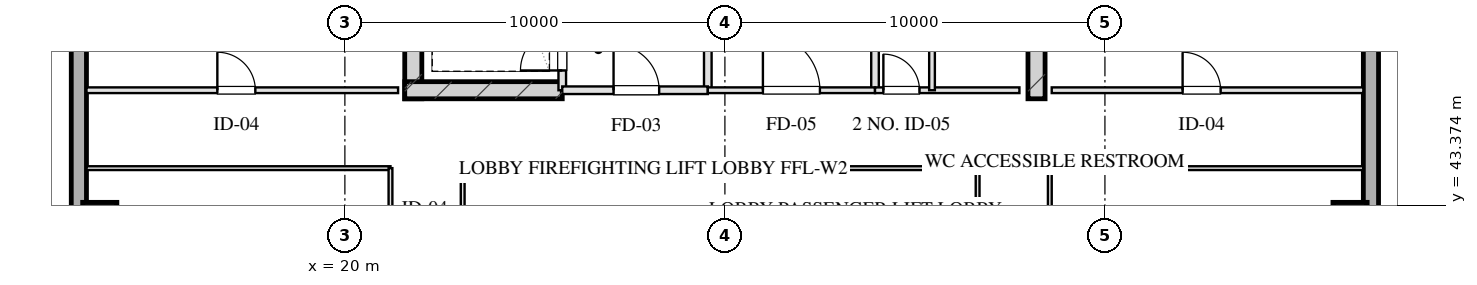
"""IFC4 building model, lengths in metres.
Left out: names, types, materials, properties, quantities, classifications, styles, units other than length and angle.
Written with IfcOpenShell. Run it as: python <this file> out.ifc"""

import sys

from ifc_helpers import new_model, si_unit, direction, frame, frame_2d, origin, origin_2d, place, context, subcontext, project, spatial, rectangle, hollow_rectangle, extrude, element, fill, save


model = new_model("IFC4")
c1 = context("Model", 3, precision=1e-05, world=origin(), true_north=direction((0.0, 1.0)))
c2 = subcontext(c1, "Body", "Model", "MODEL_VIEW")
j1 = project(units=[si_unit("LENGTHUNIT", "METRE"), si_unit("PLANEANGLEUNIT", "RADIAN")], contexts=[c1])
p1 = place(None, origin())
s1 = spatial("IfcSite", under=j1, at=p1, CompositionType="ELEMENT")
p2 = place(p1, origin())
s2 = spatial("IfcBuilding", under=s1, at=p2, CompositionType="ELEMENT")
p3 = place(p2, frame((0.0, 0.0, 212.75)))
s3 = spatial("IfcBuildingStorey", under=s2, at=p3, CompositionType="ELEMENT", Elevation=212.75)
for number, where, z_axis, x_axis in (
    (1, (21.8, 46.175, 0.0), (0.0, 0.0, 1.0), (0.0, 1.0, 0.0)),
    (2, (38.2, 46.175, 0.0), (0.0, 0.0, 1.0), (0.0, 1.0, 0.0)),
):
    element("IfcWall", number, at=place(p3, frame(where, z_axis=z_axis, x_axis=x_axis)), inside=s3, PredefinedType="SHEAR", context=c2, shape_type="SweptSolid", body=[
        extrude(rectangle(XDim=9.33, YDim=0.45, at=frame_2d((4.665, 0.0))), origin(), (0.0, 0.0, 1.0), 3.45),
    ])
p4 = place(p3, frame((21.575, 46.4, 0.0), z_axis=(0.0, 0.0, 1.0), x_axis=(1.0, 0.0, 0.0)))
e3 = element("IfcWall", 3, at=p4, inside=s3, PredefinedType="SHEAR", context=c2, shape_type="SweptSolid", body=[
    extrude(rectangle(XDim=4.145, YDim=0.45, at=frame_2d((2.073, 0.0))), origin(), (0.0, 0.0, 1.0), 3.45),
])
for number, where, z_axis, x_axis in (
    (4, (13.55, 43.0, 0.0), (0.0, 0.0, 1.0), (1.0, 0.0, 0.0)),
    (5, (46.45, 43.0, 0.0), (0.0, 0.0, 1.0), (1.0, 0.0, 0.0)),
):
    element("IfcColumn", number, at=place(p3, frame(where, z_axis=z_axis, x_axis=x_axis)), inside=s3, PredefinedType="COLUMN", context=c2, shape_type="SweptSolid", body=[
        extrude(hollow_rectangle(XDim=0.9, YDim=0.9, WallThickness=0.032, at=origin_2d()), origin(), (0.0, 0.0, 1.0), 3.451),
    ])
p5 = place(p3, frame((13.0, 10.8, 0.0), z_axis=(0.0, 0.0, 1.0), x_axis=(0.0, 1.0, 0.0)))
e6 = element("IfcWall", 6, at=p5, inside=s3, PredefinedType="SOLIDWALL", context=c2, shape_type="SweptSolid", body=[
    extrude(rectangle(XDim=46.4, YDim=0.4, at=frame_2d((23.2, 0.0))), origin(), (0.0, 0.0, 1.0), 2.55),
])
p6 = place(p5, frame((15.75, 0.0, 0.75)))
e7 = element("IfcOpeningElement", 7, at=p6, cuts=e6, PredefinedType="OPENING", context=c2, shape_type="SweptSolid", body=[
    extrude(rectangle(XDim=2.1, YDim=1.4, at=frame_2d((1.05, 0.7))), frame((0.0, 0.21, 0.0), z_axis=(0.0, -1.0, 0.0), x_axis=(1.0, 0.0, 0.0)), (0.0, 0.0, 1.0), 0.42),
])
p7 = place(p5, frame((19.55, 0.0, 0.75)))
e8 = element("IfcOpeningElement", 8, at=p7, cuts=e6, PredefinedType="OPENING", context=c2, shape_type="SweptSolid", body=[
    extrude(rectangle(XDim=2.1, YDim=1.4, at=frame_2d((1.05, 0.7))), frame((0.0, 0.21, 0.0), z_axis=(0.0, -1.0, 0.0), x_axis=(1.0, 0.0, 0.0)), (0.0, 0.0, 1.0), 0.42),
])
p8 = place(p5, frame((24.75, 0.0, 0.75)))
e9 = element("IfcOpeningElement", 9, at=p8, cuts=e6, PredefinedType="OPENING", context=c2, shape_type="SweptSolid", body=[
    extrude(rectangle(XDim=2.1, YDim=1.4, at=frame_2d((1.05, 0.7))), frame((0.0, 0.21, 0.0), z_axis=(0.0, -1.0, 0.0), x_axis=(1.0, 0.0, 0.0)), (0.0, 0.0, 1.0), 0.42),
])
p9 = place(p5, frame((28.55, 0.0, 0.75)))
e10 = element("IfcOpeningElement", 10, at=p9, cuts=e6, PredefinedType="OPENING", context=c2, shape_type="SweptSolid", body=[
    extrude(rectangle(XDim=2.1, YDim=1.4, at=frame_2d((1.05, 0.7))), frame((0.0, 0.21, 0.0), z_axis=(0.0, -1.0, 0.0), x_axis=(1.0, 0.0, 0.0)), (0.0, 0.0, 1.0), 0.42),
])
p10 = place(p3, frame((47.0, 57.2, 0.0), z_axis=(0.0, 0.0, 1.0), x_axis=(0.0, -1.0, 0.0)))
e11 = element("IfcWall", 11, at=p10, inside=s3, PredefinedType="SOLIDWALL", context=c2, shape_type="SweptSolid", body=[
    extrude(rectangle(XDim=46.4, YDim=0.4, at=frame_2d((23.2, 0.0))), origin(), (0.0, 0.0, 1.0), 2.55),
])
p11 = place(p10, frame((28.55, 0.0, 0.75)))
e12 = element("IfcOpeningElement", 12, at=p11, cuts=e11, PredefinedType="OPENING", context=c2, shape_type="SweptSolid", body=[
    extrude(rectangle(XDim=2.1, YDim=1.4, at=frame_2d((1.05, 0.7))), frame((0.0, 0.21, 0.0), z_axis=(0.0, -1.0, 0.0), x_axis=(1.0, 0.0, 0.0)), (0.0, 0.0, 1.0), 0.42),
])
p12 = place(p10, frame((24.75, 0.0, 0.75)))
e13 = element("IfcOpeningElement", 13, at=p12, cuts=e11, PredefinedType="OPENING", context=c2, shape_type="SweptSolid", body=[
    extrude(rectangle(XDim=2.1, YDim=1.4, at=frame_2d((1.05, 0.7))), frame((0.0, 0.21, 0.0), z_axis=(0.0, -1.0, 0.0), x_axis=(1.0, 0.0, 0.0)), (0.0, 0.0, 1.0), 0.42),
])
p13 = place(p10, frame((19.55, 0.0, 0.75)))
e14 = element("IfcOpeningElement", 14, at=p13, cuts=e11, PredefinedType="OPENING", context=c2, shape_type="SweptSolid", body=[
    extrude(rectangle(XDim=2.1, YDim=1.4, at=frame_2d((1.05, 0.7))), frame((0.0, 0.21, 0.0), z_axis=(0.0, -1.0, 0.0), x_axis=(1.0, 0.0, 0.0)), (0.0, 0.0, 1.0), 0.42),
])
p14 = place(p10, frame((15.75, 0.0, 0.75)))
e15 = element("IfcOpeningElement", 15, at=p14, cuts=e11, PredefinedType="OPENING", context=c2, shape_type="SweptSolid", body=[
    extrude(rectangle(XDim=2.1, YDim=1.4, at=frame_2d((1.05, 0.7))), frame((0.0, 0.21, 0.0), z_axis=(0.0, -1.0, 0.0), x_axis=(1.0, 0.0, 0.0)), (0.0, 0.0, 1.0), 0.42),
])
p15 = place(p3, frame((25.72, 46.4, 0.0), z_axis=(0.0, 0.0, 1.0), x_axis=(0.0, 1.0, 0.0)))
e16 = element("IfcWall", 16, at=p15, inside=s3, PredefinedType="PARTITIONING", context=c2, shape_type="SweptSolid", body=[
    extrude(rectangle(XDim=1.9, YDim=0.2, at=frame_2d((0.95, 0.0))), origin(), (0.0, 0.0, 1.0), 3.155),
])
p16 = place(p15, frame((0.52, 0.0, 0.0)))
e17 = element("IfcOpeningElement", 17, at=p16, cuts=e16, PredefinedType="OPENING", context=c2, shape_type="SweptSolid", body=[
    extrude(rectangle(XDim=1.1, YDim=2.05, at=frame_2d((0.55, 1.025))), frame((0.0, 0.11, 0.0), z_axis=(0.0, -1.0, 0.0), x_axis=(1.0, 0.0, 0.0)), (0.0, 0.0, 1.0), 0.22),
])
p17 = place(p3, frame((29.55, 46.4, 0.0), z_axis=(0.0, 0.0, 1.0), x_axis=(0.0, 1.0, 0.0)))
e18 = element("IfcWall", 18, at=p17, inside=s3, PredefinedType="PARTITIONING", context=c2, shape_type="SweptSolid", body=[
    extrude(rectangle(XDim=8.43, YDim=0.2, at=frame_2d((4.215, 0.0))), origin(), (0.0, 0.0, 1.0), 3.155),
])
p18 = place(p17, frame((5.95, 0.0, 0.0)))
e19 = element("IfcOpeningElement", 19, at=p18, cuts=e18, PredefinedType="OPENING", context=c2, shape_type="SweptSolid", body=[
    extrude(rectangle(XDim=0.9, YDim=2.05, at=frame_2d((0.45, 1.025))), frame((0.0, 0.11, 0.0), z_axis=(0.0, -1.0, 0.0), x_axis=(1.0, 0.0, 0.0)), (0.0, 0.0, 1.0), 0.22),
])
p19 = place(p3, frame((25.72, 46.4, 0.0), z_axis=(0.0, 0.0, 1.0), x_axis=(1.0, 0.0, 0.0)))
e20 = element("IfcWall", 20, at=p19, inside=s3, PredefinedType="PARTITIONING", context=c2, shape_type="SweptSolid", body=[
    extrude(rectangle(XDim=3.83, YDim=0.2, at=frame_2d((1.915, 0.0))), origin(), (0.0, 0.0, 1.0), 3.155),
])
p20 = place(p19, frame((1.35, 0.0, 0.0)))
e21 = element("IfcOpeningElement", 21, at=p20, cuts=e20, PredefinedType="OPENING", context=c2, shape_type="SweptSolid", body=[
    extrude(rectangle(XDim=1.2, YDim=2.05, at=frame_2d((0.6, 1.025))), frame((0.0, 0.11, 0.0), z_axis=(0.0, -1.0, 0.0), x_axis=(1.0, 0.0, 0.0)), (0.0, 0.0, 1.0), 0.22),
])
p21 = place(p3, frame((33.95, 46.4, 0.0), z_axis=(0.0, 0.0, 1.0), x_axis=(0.0, 1.0, 0.0)))
e22 = element("IfcWall", 22, at=p21, inside=s3, PredefinedType="PARTITIONING", context=c2, shape_type="SweptSolid", body=[
    extrude(rectangle(XDim=8.43, YDim=0.2, at=frame_2d((4.215, 0.0))), origin(), (0.0, 0.0, 1.0), 3.155),
])
p22 = place(p3, frame((29.55, 46.4, 0.0), z_axis=(0.0, 0.0, 1.0), x_axis=(1.0, 0.0, 0.0)))
e23 = element("IfcWall", 23, at=p22, inside=s3, PredefinedType="PARTITIONING", context=c2, shape_type="SweptSolid", body=[
    extrude(rectangle(XDim=4.4, YDim=0.15, at=frame_2d((2.2, 0.0))), origin(), (0.0, 0.0, 1.0), 3.155),
])
p23 = place(p22, frame((1.45, 0.0, 0.0)))
e24 = element("IfcOpeningElement", 24, at=p23, cuts=e23, PredefinedType="OPENING", context=c2, shape_type="SweptSolid", body=[
    extrude(rectangle(XDim=1.5, YDim=2.05, at=frame_2d((0.75, 1.025))), frame((0.0, 0.085, 0.0), z_axis=(0.0, -1.0, 0.0), x_axis=(1.0, 0.0, 0.0)), (0.0, 0.0, 1.0), 0.17),
])
p24 = place(p3, frame((33.95, 46.4, 0.0), z_axis=(0.0, 0.0, 1.0), x_axis=(1.0, 0.0, 0.0)))
e25 = element("IfcWall", 25, at=p24, inside=s3, PredefinedType="PARTITIONING", context=c2, shape_type="SweptSolid", body=[
    extrude(rectangle(XDim=3.8, YDim=0.15, at=frame_2d((1.9, 0.0))), origin(), (0.0, 0.0, 1.0), 3.155),
])
p25 = place(p24, frame((0.22, 0.0, 0.0)))
e26 = element("IfcOpeningElement", 26, at=p25, cuts=e25, PredefinedType="OPENING", context=c2, shape_type="SweptSolid", body=[
    extrude(rectangle(XDim=0.95, YDim=2.05, at=frame_2d((0.475, 1.025))), frame((0.0, 0.085, 0.0), z_axis=(0.0, -1.0, 0.0), x_axis=(1.0, 0.0, 0.0)), (0.0, 0.0, 1.0), 0.17),
])
p26 = place(p3, frame((35.45, 46.4, 0.0), z_axis=(0.0, 0.0, 1.0), x_axis=(0.0, 1.0, 0.0)))
e27 = element("IfcWall", 27, at=p26, inside=s3, PredefinedType="PARTITIONING", context=c2, shape_type="SweptSolid", body=[
    extrude(rectangle(XDim=8.43, YDim=0.15, at=frame_2d((4.215, 0.0))), origin(), (0.0, 0.0, 1.0), 2.795),
])
p27 = place(p26, frame((2.55, 0.0, 0.0)))
e28 = element("IfcOpeningElement", 28, at=p27, cuts=e27, PredefinedType="OPENING", context=c2, shape_type="SweptSolid", body=[
    extrude(rectangle(XDim=0.95, YDim=2.05, at=frame_2d((0.475, 1.025))), frame((0.0, 0.085, 0.0), z_axis=(0.0, -1.0, 0.0), x_axis=(1.0, 0.0, 0.0)), (0.0, 0.0, 1.0), 0.17),
])
p28 = place(p26, frame((5.8, 0.0, 0.0)))
e29 = element("IfcOpeningElement", 29, at=p28, cuts=e27, PredefinedType="OPENING", context=c2, shape_type="SweptSolid", body=[
    extrude(rectangle(XDim=0.9, YDim=2.05, at=frame_2d((0.45, 1.025))), frame((0.0, 0.085, 0.0), z_axis=(0.0, -1.0, 0.0), x_axis=(1.0, 0.0, 0.0)), (0.0, 0.0, 1.0), 0.17),
])
p29 = place(p3, frame((13.2, 46.4, 0.0), z_axis=(0.0, 0.0, 1.0), x_axis=(1.0, 0.0, 0.0)))
e30 = element("IfcWall", 30, at=p29, inside=s3, PredefinedType="PARTITIONING", context=c2, shape_type="SweptSolid", body=[
    extrude(rectangle(XDim=8.2, YDim=0.15, at=frame_2d((4.1, 0.0))), origin(), (0.0, 0.0, 1.0), 3.155),
])
p30 = place(p29, frame((3.444, 0.0, 0.0)))
e31 = element("IfcOpeningElement", 31, at=p30, cuts=e30, PredefinedType="OPENING", context=c2, shape_type="SweptSolid", body=[
    extrude(rectangle(XDim=1.0, YDim=2.05, at=frame_2d((0.5, 1.025))), frame((0.0, 0.085, 0.0), z_axis=(0.0, -1.0, 0.0), x_axis=(1.0, 0.0, 0.0)), (0.0, 0.0, 1.0), 0.17),
])
p31 = place(p3, frame((38.6, 46.4, 0.0), z_axis=(0.0, 0.0, 1.0), x_axis=(1.0, 0.0, 0.0)))
e32 = element("IfcWall", 32, at=p31, inside=s3, PredefinedType="PARTITIONING", context=c2, shape_type="SweptSolid", body=[
    extrude(rectangle(XDim=8.2, YDim=0.15, at=frame_2d((4.1, 0.0))), origin(), (0.0, 0.0, 1.0), 3.155),
])
p32 = place(p31, frame((3.444, 0.0, 0.0)))
e33 = element("IfcOpeningElement", 33, at=p32, cuts=e32, PredefinedType="OPENING", context=c2, shape_type="SweptSolid", body=[
    extrude(rectangle(XDim=1.0, YDim=2.05, at=frame_2d((0.5, 1.025))), frame((0.0, 0.085, 0.0), z_axis=(0.0, -1.0, 0.0), x_axis=(1.0, 0.0, 0.0)), (0.0, 0.0, 1.0), 0.17),
])
p33 = place(p3, frame((13.2, 44.35, 0.0), z_axis=(0.0, 0.0, 1.0), x_axis=(1.0, 0.0, 0.0)))
e34 = element("IfcWall", 34, at=p33, inside=s3, PredefinedType="MOVABLE", context=c2, shape_type="SweptSolid", body=[
    extrude(rectangle(XDim=8.0, YDim=0.1, at=frame_2d((4.0, 0.0))), origin(), (0.0, 0.0, 1.0), 3.155),
])
p34 = place(p3, frame((23.1, 44.35, 0.0), z_axis=(0.0, 0.0, 1.0), x_axis=(1.0, 0.0, 0.0)))
e35 = element("IfcWall", 35, at=p34, inside=s3, PredefinedType="MOVABLE", context=c2, shape_type="SweptSolid", body=[
    extrude(rectangle(XDim=13.55, YDim=0.1, at=frame_2d((6.775, 0.0))), origin(), (0.0, 0.0, 1.0), 3.155),
])
p35 = place(p3, frame((38.55, 44.35, 0.0), z_axis=(0.0, 0.0, 1.0), x_axis=(1.0, 0.0, 0.0)))
e36 = element("IfcWall", 36, at=p35, inside=s3, PredefinedType="MOVABLE", context=c2, shape_type="SweptSolid", body=[
    extrude(rectangle(XDim=8.25, YDim=0.1, at=frame_2d((4.125, 0.0))), origin(), (0.0, 0.0, 1.0), 3.155),
])
p36 = place(p3, frame((21.2, 23.65, 0.0), z_axis=(0.0, 0.0, 1.0), x_axis=(0.0, 1.0, 0.0)))
e37 = element("IfcWall", 37, at=p36, inside=s3, PredefinedType="MOVABLE", context=c2, shape_type="SweptSolid", body=[
    extrude(rectangle(XDim=20.7, YDim=0.1, at=frame_2d((10.35, 0.0))), origin(), (0.0, 0.0, 1.0), 3.155),
])
p37 = place(p36, frame((2.175, 0.0, 0.0)))
e38 = element("IfcOpeningElement", 38, at=p37, cuts=e37, PredefinedType="OPENING", context=c2, shape_type="SweptSolid", body=[
    extrude(rectangle(XDim=1.0, YDim=2.05, at=frame_2d((0.5, 1.025))), frame((0.0, 0.06, 0.0), z_axis=(0.0, -1.0, 0.0), x_axis=(1.0, 0.0, 0.0)), (0.0, 0.0, 1.0), 0.12),
])
p38 = place(p36, frame((6.75, 0.0, 0.0)))
e39 = element("IfcOpeningElement", 39, at=p38, cuts=e37, PredefinedType="OPENING", context=c2, shape_type="SweptSolid", body=[
    extrude(rectangle(XDim=1.0, YDim=2.05, at=frame_2d((0.5, 1.025))), frame((0.0, 0.06, 0.0), z_axis=(0.0, -1.0, 0.0), x_axis=(1.0, 0.0, 0.0)), (0.0, 0.0, 1.0), 0.12),
])
p39 = place(p36, frame((9.85, 0.0, 0.0)))
e40 = element("IfcOpeningElement", 40, at=p39, cuts=e37, PredefinedType="OPENING", context=c2, shape_type="SweptSolid", body=[
    extrude(rectangle(XDim=1.05, YDim=2.05, at=frame_2d((0.525, 1.025))), frame((0.0, 0.06, 0.0), z_axis=(0.0, -1.0, 0.0), x_axis=(1.0, 0.0, 0.0)), (0.0, 0.0, 1.0), 0.12),
])
p40 = place(p36, frame((12.95, 0.0, 0.0)))
e41 = element("IfcOpeningElement", 41, at=p40, cuts=e37, PredefinedType="OPENING", context=c2, shape_type="SweptSolid", body=[
    extrude(rectangle(XDim=1.0, YDim=2.05, at=frame_2d((0.5, 1.025))), frame((0.0, 0.06, 0.0), z_axis=(0.0, -1.0, 0.0), x_axis=(1.0, 0.0, 0.0)), (0.0, 0.0, 1.0), 0.12),
])
p41 = place(p36, frame((17.525, 0.0, 0.0)))
e42 = element("IfcOpeningElement", 42, at=p41, cuts=e37, PredefinedType="OPENING", context=c2, shape_type="SweptSolid", body=[
    extrude(rectangle(XDim=1.0, YDim=2.05, at=frame_2d((0.5, 1.025))), frame((0.0, 0.06, 0.0), z_axis=(0.0, -1.0, 0.0), x_axis=(1.0, 0.0, 0.0)), (0.0, 0.0, 1.0), 0.12),
])
p42 = place(p3, frame((23.1, 23.65, 0.0), z_axis=(0.0, 0.0, 1.0), x_axis=(0.0, 1.0, 0.0)))
e43 = element("IfcWall", 43, at=p42, inside=s3, PredefinedType="MOVABLE", context=c2, shape_type="SweptSolid", body=[
    extrude(rectangle(XDim=20.7, YDim=0.1, at=frame_2d((10.35, 0.0))), origin(), (0.0, 0.0, 1.0), 3.155),
])
p43 = place(p42, frame((2.857, 0.0, 0.0)))
e44 = element("IfcOpeningElement", 44, at=p43, cuts=e43, PredefinedType="OPENING", context=c2, shape_type="SweptSolid", body=[
    extrude(rectangle(XDim=1.1, YDim=2.05, at=frame_2d((0.55, 1.025))), frame((0.0, 0.06, 0.0), z_axis=(0.0, -1.0, 0.0), x_axis=(1.0, 0.0, 0.0)), (0.0, 0.0, 1.0), 0.12),
])
p44 = place(p42, frame((17.208, 0.0, 0.0)))
e45 = element("IfcOpeningElement", 45, at=p44, cuts=e43, PredefinedType="OPENING", context=c2, shape_type="SweptSolid", body=[
    extrude(rectangle(XDim=1.1, YDim=2.05, at=frame_2d((0.55, 1.025))), frame((0.0, 0.06, 0.0), z_axis=(0.0, -1.0, 0.0), x_axis=(1.0, 0.0, 0.0)), (0.0, 0.0, 1.0), 0.12),
])
p45 = place(p3, frame((36.65, 23.65, 0.0), z_axis=(0.0, 0.0, 1.0), x_axis=(0.0, 1.0, 0.0)))
e46 = element("IfcWall", 46, at=p45, inside=s3, PredefinedType="MOVABLE", context=c2, shape_type="SweptSolid", body=[
    extrude(rectangle(XDim=20.7, YDim=0.1, at=frame_2d((10.35, 0.0))), origin(), (0.0, 0.0, 1.0), 3.155),
])
p46 = place(p45, frame((9.71, 0.0, 0.0)))
e47 = element("IfcOpeningElement", 47, at=p46, cuts=e46, PredefinedType="OPENING", context=c2, shape_type="SweptSolid", body=[
    extrude(rectangle(XDim=1.1, YDim=2.05, at=frame_2d((0.55, 1.025))), frame((0.0, 0.06, 0.0), z_axis=(0.0, -1.0, 0.0), x_axis=(1.0, 0.0, 0.0)), (0.0, 0.0, 1.0), 0.12),
])
p47 = place(p3, frame((38.55, 23.65, 0.0), z_axis=(0.0, 0.0, 1.0), x_axis=(0.0, 1.0, 0.0)))
e48 = element("IfcWall", 48, at=p47, inside=s3, PredefinedType="MOVABLE", context=c2, shape_type="SweptSolid", body=[
    extrude(rectangle(XDim=20.7, YDim=0.1, at=frame_2d((10.35, 0.0))), origin(), (0.0, 0.0, 1.0), 3.155),
])
p48 = place(p47, frame((2.675, 0.0, 0.0)))
e49 = element("IfcOpeningElement", 49, at=p48, cuts=e48, PredefinedType="OPENING", context=c2, shape_type="SweptSolid", body=[
    extrude(rectangle(XDim=1.0, YDim=2.05, at=frame_2d((0.5, 1.025))), frame((0.0, 0.06, 0.0), z_axis=(0.0, -1.0, 0.0), x_axis=(1.0, 0.0, 0.0)), (0.0, 0.0, 1.0), 0.12),
])
p49 = place(p47, frame((9.85, 0.0, 0.0)))
e50 = element("IfcOpeningElement", 50, at=p49, cuts=e48, PredefinedType="OPENING", context=c2, shape_type="SweptSolid", body=[
    extrude(rectangle(XDim=1.05, YDim=2.05, at=frame_2d((0.525, 1.025))), frame((0.0, 0.06, 0.0), z_axis=(0.0, -1.0, 0.0), x_axis=(1.0, 0.0, 0.0)), (0.0, 0.0, 1.0), 0.12),
])
p50 = place(p47, frame((17.025, 0.0, 0.0)))
e51 = element("IfcOpeningElement", 51, at=p50, cuts=e48, PredefinedType="OPENING", context=c2, shape_type="SweptSolid", body=[
    extrude(rectangle(XDim=1.0, YDim=2.05, at=frame_2d((0.5, 1.025))), frame((0.0, 0.06, 0.0), z_axis=(0.0, -1.0, 0.0), x_axis=(1.0, 0.0, 0.0)), (0.0, 0.0, 1.0), 0.12),
])
p51 = place(p16, origin())
e52 = element("IfcDoor", 52, at=p51, inside=s3, OperationType="SINGLE_SWING_LEFT", PredefinedType="DOOR", context=c2, shape_type="SweptSolid", body=[
    extrude(rectangle(XDim=1.1, YDim=2.05, at=frame_2d((0.55, 1.025))), frame((0.0, 0.025, 0.0), z_axis=(0.0, -1.0, 0.0), x_axis=(1.0, 0.0, 0.0)), (0.0, 0.0, 1.0), 0.05),
])
fill(e17, e52)
p52 = place(p20, origin())
e53 = element("IfcDoor", 53, at=p52, inside=s3, OperationType="SINGLE_SWING_LEFT", PredefinedType="DOOR", context=c2, shape_type="SweptSolid", body=[
    extrude(rectangle(XDim=1.2, YDim=2.05, at=frame_2d((0.6, 1.025))), frame((0.0, 0.025, 0.0), z_axis=(0.0, -1.0, 0.0), x_axis=(1.0, 0.0, 0.0)), (0.0, 0.0, 1.0), 0.05),
])
fill(e21, e53)
p53 = place(p23, origin())
e54 = element("IfcDoor", 54, at=p53, inside=s3, OperationType="SINGLE_SWING_LEFT", PredefinedType="DOOR", context=c2, shape_type="SweptSolid", body=[
    extrude(rectangle(XDim=1.5, YDim=2.05, at=frame_2d((0.75, 1.025))), frame((0.0, 0.025, 0.0), z_axis=(0.0, -1.0, 0.0), x_axis=(1.0, 0.0, 0.0)), (0.0, 0.0, 1.0), 0.05),
])
fill(e24, e54)
p54 = place(p25, origin())
e55 = element("IfcDoor", 55, at=p54, inside=s3, OperationType="SINGLE_SWING_LEFT", PredefinedType="DOOR", context=c2, shape_type="SweptSolid", body=[
    extrude(rectangle(XDim=0.95, YDim=2.05, at=frame_2d((0.475, 1.025))), frame((0.0, 0.025, 0.0), z_axis=(0.0, -1.0, 0.0), x_axis=(1.0, 0.0, 0.0)), (0.0, 0.0, 1.0), 0.05),
])
fill(e26, e55)
p55 = place(p30, origin())
e56 = element("IfcDoor", 56, at=p55, inside=s3, OperationType="SINGLE_SWING_LEFT", PredefinedType="DOOR", context=c2, shape_type="SweptSolid", body=[
    extrude(rectangle(XDim=1.0, YDim=2.05, at=frame_2d((0.5, 1.025))), frame((0.0, 0.025, 0.0), z_axis=(0.0, -1.0, 0.0), x_axis=(1.0, 0.0, 0.0)), (0.0, 0.0, 1.0), 0.05),
])
fill(e31, e56)
p56 = place(p32, origin())
e57 = element("IfcDoor", 57, at=p56, inside=s3, OperationType="SINGLE_SWING_LEFT", PredefinedType="DOOR", context=c2, shape_type="SweptSolid", body=[
    extrude(rectangle(XDim=1.0, YDim=2.05, at=frame_2d((0.5, 1.025))), frame((0.0, 0.025, 0.0), z_axis=(0.0, -1.0, 0.0), x_axis=(1.0, 0.0, 0.0)), (0.0, 0.0, 1.0), 0.05),
])
fill(e33, e57)
save(model, sys.argv[1])
